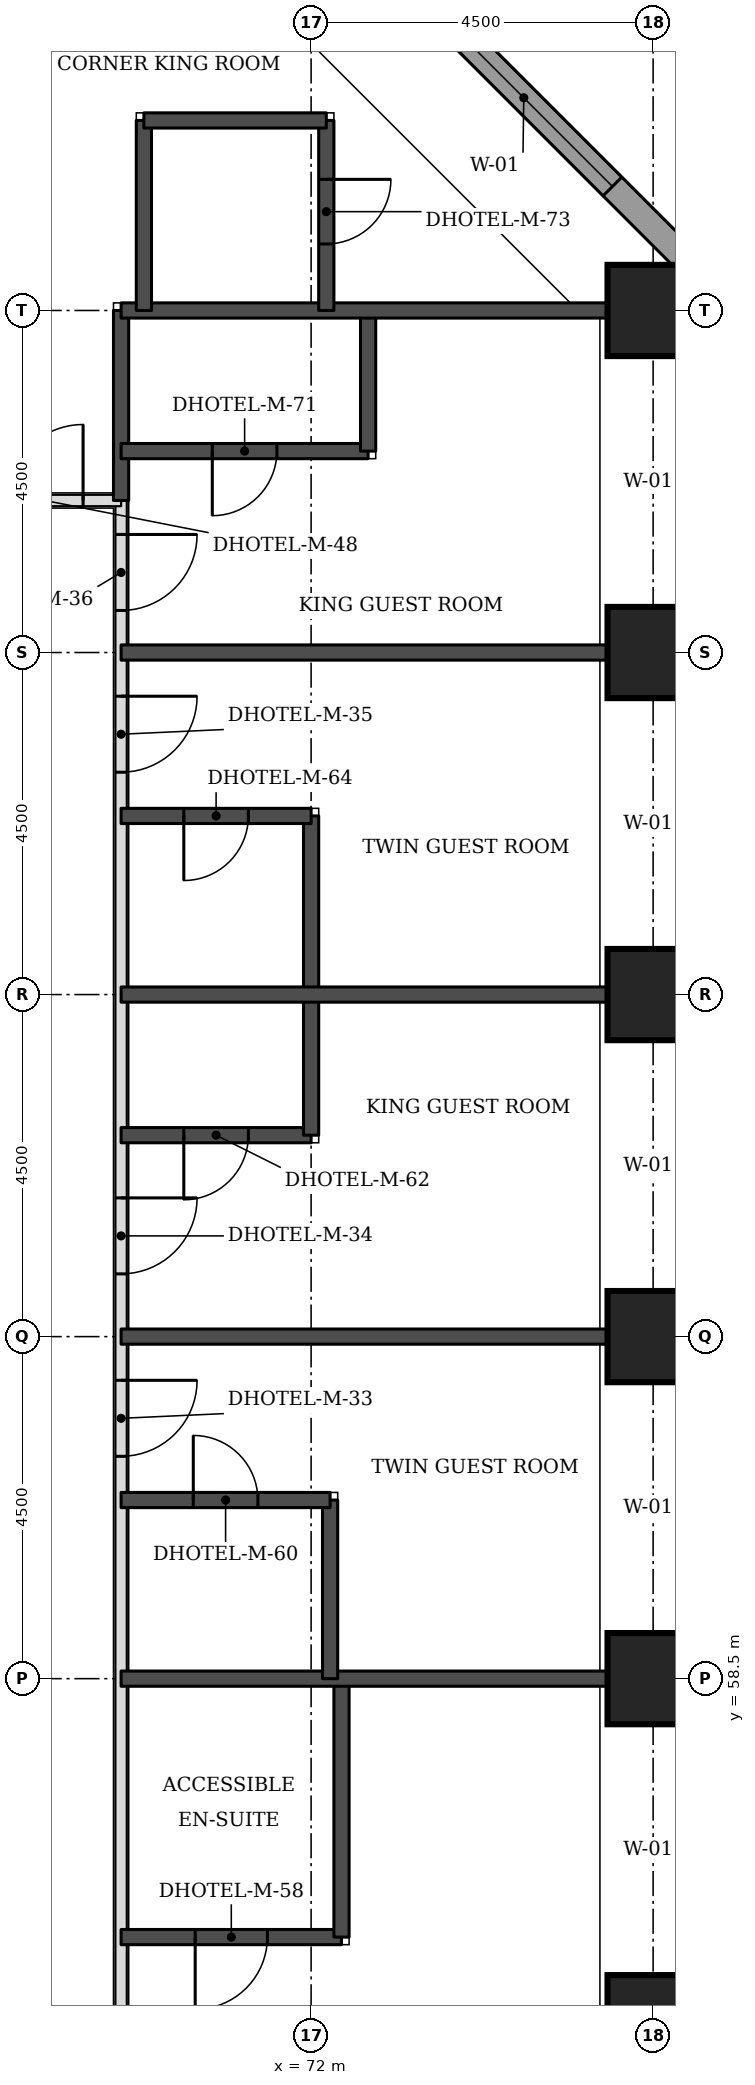
"""IFC4 building model, lengths in metres.
Left out: names, types, materials, properties, quantities, classifications, styles, units other than length and angle.
Written with IfcOpenShell. Run it as: python <this file> out.ifc"""

import sys

from ifc_helpers import new_model, si_unit, direction, frame, frame_2d, origin, origin_2d, place, context, subcontext, project, spatial, rectangle, extrude, element, fill, save


model = new_model("IFC4")
c1 = context("Model", 3, precision=1e-05, world=origin(), true_north=direction((0.0, 1.0)))
c2 = subcontext(c1, "Body", "Model", "MODEL_VIEW")
j1 = project(units=[si_unit("LENGTHUNIT", "METRE"), si_unit("PLANEANGLEUNIT", "RADIAN")], contexts=[c1])
p1 = place(None, origin())
s1 = spatial("IfcSite", under=j1, at=p1, CompositionType="ELEMENT")
p2 = place(p1, origin())
s2 = spatial("IfcBuilding", under=s1, at=p2, CompositionType="ELEMENT")
p3 = place(p2, frame((0.0, 0.0, 23.1)))
s3 = spatial("IfcBuildingStorey", under=s2, at=p3, CompositionType="ELEMENT", Elevation=23.1)
for number, where, z_axis, x_axis in (
    (1, (76.5, 54.0, 0.0), (0.0, 0.0, 1.0), (1.0, 0.0, 0.0)),
    (2, (76.5, 58.5, 0.0), (0.0, 0.0, 1.0), (1.0, 0.0, 0.0)),
    (3, (76.5, 63.0, 0.0), (0.0, 0.0, 1.0), (1.0, 0.0, 0.0)),
    (4, (76.5, 67.5, 0.0), (0.0, 0.0, 1.0), (1.0, 0.0, 0.0)),
    (5, (76.5, 72.0, 0.0), (0.0, 0.0, 1.0), (1.0, 0.0, 0.0)),
    (6, (76.5, 76.5, 0.0), (0.0, 0.0, 1.0), (1.0, 0.0, 0.0)),
):
    element("IfcColumn", number, at=place(p3, frame(where, z_axis=z_axis, x_axis=x_axis)), inside=s3, PredefinedType="COLUMN", context=c2, shape_type="SweptSolid", body=[
        extrude(rectangle(XDim=1.2, YDim=1.2, at=origin_2d()), origin(), (0.0, 0.0, 1.0), 3.3),
    ])
p4 = place(p3, frame((77.326, 76.77, 0.0), z_axis=(0.0, 0.0, 1.0), x_axis=(-0.707106781187, 0.707106781187, 0.0)))
e7 = element("IfcWall", 7, at=p4, inside=s3, PredefinedType="STANDARD", context=c2, shape_type="SweptSolid", body=[
    extrude(rectangle(XDim=7.151, YDim=0.35, at=frame_2d((3.576, 0.0))), origin(), (0.0, 0.0, 1.0), 3.055),
])
p5 = place(p4, frame((1.926, 0.0, 0.8)))
e8 = element("IfcOpeningElement", 8, at=p5, cuts=e7, PredefinedType="OPENING", context=c2, shape_type="SweptSolid", body=[
    extrude(rectangle(XDim=3.3, YDim=1.5, at=frame_2d((1.65, 0.75))), frame((0.0, 0.185, 0.0), z_axis=(0.0, -1.0, 0.0), x_axis=(1.0, 0.0, 0.0)), (0.0, 0.0, 1.0), 0.37),
])
p6 = place(p3, frame((69.5, 47.5, 0.0), z_axis=(0.0, 0.0, 1.0), x_axis=(0.0, 1.0, 0.0)))
e9 = element("IfcWall", 9, at=p6, inside=s3, PredefinedType="PARTITIONING", context=c2, shape_type="SweptSolid", body=[
    extrude(rectangle(XDim=26.5, YDim=0.15, at=frame_2d((13.25, 0.0))), origin(), (0.0, 0.0, 1.0), 3.08),
])
p7 = place(p6, frame((25.053, 0.0, 0.0)))
e10 = element("IfcOpeningElement", 10, at=p7, cuts=e9, PredefinedType="OPENING", context=c2, shape_type="SweptSolid", body=[
    extrude(rectangle(XDim=1.0, YDim=2.1, at=frame_2d((0.5, 1.05))), frame((0.0, 0.085, 0.0), z_axis=(0.0, -1.0, 0.0), x_axis=(1.0, 0.0, 0.0)), (0.0, 0.0, 1.0), 0.17),
])
p8 = place(p6, frame((22.925, 0.0, 0.0)))
e11 = element("IfcOpeningElement", 11, at=p8, cuts=e9, PredefinedType="OPENING", context=c2, shape_type="SweptSolid", body=[
    extrude(rectangle(XDim=1.0, YDim=2.1, at=frame_2d((0.5, 1.05))), frame((0.0, 0.085, 0.0), z_axis=(0.0, -1.0, 0.0), x_axis=(1.0, 0.0, 0.0)), (0.0, 0.0, 1.0), 0.17),
])
p9 = place(p6, frame((16.325, 0.0, 0.0)))
e12 = element("IfcOpeningElement", 12, at=p9, cuts=e9, PredefinedType="OPENING", context=c2, shape_type="SweptSolid", body=[
    extrude(rectangle(XDim=1.0, YDim=2.1, at=frame_2d((0.5, 1.05))), frame((0.0, 0.085, 0.0), z_axis=(0.0, -1.0, 0.0), x_axis=(1.0, 0.0, 0.0)), (0.0, 0.0, 1.0), 0.17),
])
p10 = place(p6, frame((13.925, 0.0, 0.0)))
e13 = element("IfcOpeningElement", 13, at=p10, cuts=e9, PredefinedType="OPENING", context=c2, shape_type="SweptSolid", body=[
    extrude(rectangle(XDim=1.0, YDim=2.1, at=frame_2d((0.5, 1.05))), frame((0.0, 0.085, 0.0), z_axis=(0.0, -1.0, 0.0), x_axis=(1.0, 0.0, 0.0)), (0.0, 0.0, 1.0), 0.17),
])
p11 = place(p6, frame((4.25, 0.0, 0.0)))
e14 = element("IfcOpeningElement", 14, at=p11, cuts=e9, PredefinedType="OPENING", context=c2, shape_type="SweptSolid", body=[
    extrude(rectangle(XDim=1.1, YDim=2.1, at=frame_2d((0.55, 1.05))), frame((0.0, 0.085, 0.0), z_axis=(0.0, -1.0, 0.0), x_axis=(1.0, 0.0, 0.0)), (0.0, 0.0, 1.0), 0.17),
])
p12 = place(p6, frame((0.447, 0.0, 0.0)))
e15 = element("IfcOpeningElement", 15, at=p12, cuts=e9, PredefinedType="OPENING", context=c2, shape_type="SweptSolid", body=[
    extrude(rectangle(XDim=1.0, YDim=2.1, at=frame_2d((0.5, 1.05))), frame((0.0, 0.085, 0.0), z_axis=(0.0, -1.0, 0.0), x_axis=(1.0, 0.0, 0.0)), (0.0, 0.0, 1.0), 0.17),
])
p13 = place(p3, frame((43.0, 74.0, 0.0), z_axis=(0.0, 0.0, 1.0), x_axis=(1.0, 0.0, 0.0)))
e16 = element("IfcWall", 16, at=p13, inside=s3, PredefinedType="PARTITIONING", context=c2, shape_type="SweptSolid", body=[
    extrude(rectangle(XDim=26.5, YDim=0.15, at=frame_2d((13.25, 0.0))), origin(), (0.0, 0.0, 1.0), 3.08),
])
p14 = place(p13, frame((4.925, 0.0, 0.0)))
e17 = element("IfcOpeningElement", 17, at=p14, cuts=e16, PredefinedType="OPENING", context=c2, shape_type="SweptSolid", body=[
    extrude(rectangle(XDim=1.0, YDim=2.1, at=frame_2d((0.5, 1.05))), frame((0.0, 0.085, 0.0), z_axis=(0.0, -1.0, 0.0), x_axis=(1.0, 0.0, 0.0)), (0.0, 0.0, 1.0), 0.17),
])
p15 = place(p13, frame((7.325, 0.0, 0.0)))
e18 = element("IfcOpeningElement", 18, at=p15, cuts=e16, PredefinedType="OPENING", context=c2, shape_type="SweptSolid", body=[
    extrude(rectangle(XDim=1.0, YDim=2.1, at=frame_2d((0.5, 1.05))), frame((0.0, 0.085, 0.0), z_axis=(0.0, -1.0, 0.0), x_axis=(1.0, 0.0, 0.0)), (0.0, 0.0, 1.0), 0.17),
])
p16 = place(p13, frame((13.925, 0.0, 0.0)))
e19 = element("IfcOpeningElement", 19, at=p16, cuts=e16, PredefinedType="OPENING", context=c2, shape_type="SweptSolid", body=[
    extrude(rectangle(XDim=1.0, YDim=2.1, at=frame_2d((0.5, 1.05))), frame((0.0, 0.085, 0.0), z_axis=(0.0, -1.0, 0.0), x_axis=(1.0, 0.0, 0.0)), (0.0, 0.0, 1.0), 0.17),
])
p17 = place(p13, frame((16.325, 0.0, 0.0)))
e20 = element("IfcOpeningElement", 20, at=p17, cuts=e16, PredefinedType="OPENING", context=c2, shape_type="SweptSolid", body=[
    extrude(rectangle(XDim=1.0, YDim=2.1, at=frame_2d((0.5, 1.05))), frame((0.0, 0.085, 0.0), z_axis=(0.0, -1.0, 0.0), x_axis=(1.0, 0.0, 0.0)), (0.0, 0.0, 1.0), 0.17),
])
p18 = place(p13, frame((22.925, 0.0, 0.0)))
e21 = element("IfcOpeningElement", 21, at=p18, cuts=e16, PredefinedType="OPENING", context=c2, shape_type="SweptSolid", body=[
    extrude(rectangle(XDim=1.0, YDim=2.1, at=frame_2d((0.5, 1.05))), frame((0.0, 0.085, 0.0), z_axis=(0.0, -1.0, 0.0), x_axis=(1.0, 0.0, 0.0)), (0.0, 0.0, 1.0), 0.17),
])
p19 = place(p13, frame((0.5, 0.0, 0.0)))
e22 = element("IfcOpeningElement", 22, at=p19, cuts=e16, PredefinedType="OPENING", context=c2, shape_type="SweptSolid", body=[
    extrude(rectangle(XDim=1.0, YDim=2.1, at=frame_2d((0.5, 1.05))), frame((0.0, 0.085, 0.0), z_axis=(0.0, -1.0, 0.0), x_axis=(1.0, 0.0, 0.0)), (0.0, 0.0, 1.0), 0.17),
])
p20 = place(p13, frame((25.0, 0.0, 0.0)))
e23 = element("IfcOpeningElement", 23, at=p20, cuts=e16, PredefinedType="OPENING", context=c2, shape_type="SweptSolid", body=[
    extrude(rectangle(XDim=1.0, YDim=2.1, at=frame_2d((0.5, 1.05))), frame((0.0, 0.085, 0.0), z_axis=(0.0, -1.0, 0.0), x_axis=(1.0, 0.0, 0.0)), (0.0, 0.0, 1.0), 0.17),
])
p21 = place(p3, frame((69.5, 55.1, 0.0), z_axis=(0.0, 0.0, 1.0), x_axis=(1.0, 0.0, 0.0)))
e24 = element("IfcWall", 24, at=p21, inside=s3, PredefinedType="SOLIDWALL", context=c2, shape_type="SweptSolid", body=[
    extrude(rectangle(XDim=2.9, YDim=0.2, at=frame_2d((1.45, 0.0))), origin(), (0.0, 0.0, 1.0), 3.08),
])
p22 = place(p21, frame((0.975, 0.0, 0.0)))
e25 = element("IfcOpeningElement", 25, at=p22, cuts=e24, PredefinedType="OPENING", context=c2, shape_type="SweptSolid", body=[
    extrude(rectangle(XDim=0.95, YDim=2.1, at=frame_2d((0.475, 1.05))), frame((0.0, 0.11, 0.0), z_axis=(0.0, -1.0, 0.0), x_axis=(1.0, 0.0, 0.0)), (0.0, 0.0, 1.0), 0.22),
])
p23 = place(p3, frame((72.4, 55.1, 0.0), z_axis=(0.0, 0.0, 1.0), x_axis=(0.0, 1.0, 0.0)))
e26 = element("IfcWall", 26, at=p23, inside=s3, PredefinedType="SOLIDWALL", context=c2, shape_type="SweptSolid", body=[
    extrude(rectangle(XDim=3.4, YDim=0.2, at=frame_2d((1.7, 0.0))), origin(), (0.0, 0.0, 1.0), 3.08),
])
p24 = place(p3, frame((69.5, 58.5, 0.0), z_axis=(0.0, 0.0, 1.0), x_axis=(1.0, 0.0, 0.0)))
e27 = element("IfcWall", 27, at=p24, inside=s3, PredefinedType="SOLIDWALL", context=c2, shape_type="SweptSolid", body=[
    extrude(rectangle(XDim=6.4, YDim=0.2, at=frame_2d((3.2, 0.0))), origin(), (0.0, 0.0, 1.0), 3.08),
])
p25 = place(p3, frame((72.25, 58.5, 0.0), z_axis=(0.0, 0.0, 1.0), x_axis=(0.0, 1.0, 0.0)))
e28 = element("IfcWall", 28, at=p25, inside=s3, PredefinedType="SOLIDWALL", context=c2, shape_type="SweptSolid", body=[
    extrude(rectangle(XDim=2.35, YDim=0.2, at=frame_2d((1.175, 0.0))), origin(), (0.0, 0.0, 1.0), 3.08),
])
p26 = place(p3, frame((69.5, 60.85, 0.0), z_axis=(0.0, 0.0, 1.0), x_axis=(1.0, 0.0, 0.0)))
e29 = element("IfcWall", 29, at=p26, inside=s3, PredefinedType="SOLIDWALL", context=c2, shape_type="SweptSolid", body=[
    extrude(rectangle(XDim=2.75, YDim=0.2, at=frame_2d((1.375, 0.0))), origin(), (0.0, 0.0, 1.0), 3.08),
])
p27 = place(p26, frame((0.95, 0.0, 0.0)))
e30 = element("IfcOpeningElement", 30, at=p27, cuts=e29, PredefinedType="OPENING", context=c2, shape_type="SweptSolid", body=[
    extrude(rectangle(XDim=0.85, YDim=2.1, at=frame_2d((0.425, 1.05))), frame((0.0, 0.11, 0.0), z_axis=(0.0, -1.0, 0.0), x_axis=(1.0, 0.0, 0.0)), (0.0, 0.0, 1.0), 0.22),
])
p28 = place(p3, frame((69.5, 63.0, 0.0), z_axis=(0.0, 0.0, 1.0), x_axis=(1.0, 0.0, 0.0)))
e31 = element("IfcWall", 31, at=p28, inside=s3, PredefinedType="SOLIDWALL", context=c2, shape_type="SweptSolid", body=[
    extrude(rectangle(XDim=6.4, YDim=0.2, at=frame_2d((3.2, 0.0))), origin(), (0.0, 0.0, 1.0), 3.08),
])
p29 = place(p3, frame((69.5, 65.65, 0.0), z_axis=(0.0, 0.0, 1.0), x_axis=(1.0, 0.0, 0.0)))
e32 = element("IfcWall", 32, at=p29, inside=s3, PredefinedType="SOLIDWALL", context=c2, shape_type="SweptSolid", body=[
    extrude(rectangle(XDim=2.5, YDim=0.2, at=frame_2d((1.25, 0.0))), origin(), (0.0, 0.0, 1.0), 3.08),
])
p30 = place(p29, frame((0.825, 0.0, 0.0)))
e33 = element("IfcOpeningElement", 33, at=p30, cuts=e32, PredefinedType="OPENING", context=c2, shape_type="SweptSolid", body=[
    extrude(rectangle(XDim=0.85, YDim=2.1, at=frame_2d((0.425, 1.05))), frame((0.0, 0.11, 0.0), z_axis=(0.0, -1.0, 0.0), x_axis=(1.0, 0.0, 0.0)), (0.0, 0.0, 1.0), 0.22),
])
p31 = place(p3, frame((72.0, 65.65, 0.0), z_axis=(0.0, 0.0, 1.0), x_axis=(0.0, 1.0, 0.0)))
e34 = element("IfcWall", 34, at=p31, inside=s3, PredefinedType="SOLIDWALL", context=c2, shape_type="SweptSolid", body=[
    extrude(rectangle(XDim=4.2, YDim=0.2, at=frame_2d((2.1, 0.0))), origin(), (0.0, 0.0, 1.0), 3.08),
])
p32 = place(p3, frame((69.5, 67.5, 0.0), z_axis=(0.0, 0.0, 1.0), x_axis=(1.0, 0.0, 0.0)))
e35 = element("IfcWall", 35, at=p32, inside=s3, PredefinedType="SOLIDWALL", context=c2, shape_type="SweptSolid", body=[
    extrude(rectangle(XDim=6.4, YDim=0.2, at=frame_2d((3.2, 0.0))), origin(), (0.0, 0.0, 1.0), 3.08),
])
p33 = place(p3, frame((69.5, 69.85, 0.0), z_axis=(0.0, 0.0, 1.0), x_axis=(1.0, 0.0, 0.0)))
e36 = element("IfcWall", 36, at=p33, inside=s3, PredefinedType="SOLIDWALL", context=c2, shape_type="SweptSolid", body=[
    extrude(rectangle(XDim=2.5, YDim=0.2, at=frame_2d((1.25, 0.0))), origin(), (0.0, 0.0, 1.0), 3.08),
])
p34 = place(p33, frame((0.825, 0.0, 0.0)))
e37 = element("IfcOpeningElement", 37, at=p34, cuts=e36, PredefinedType="OPENING", context=c2, shape_type="SweptSolid", body=[
    extrude(rectangle(XDim=0.85, YDim=2.1, at=frame_2d((0.425, 1.05))), frame((0.0, 0.11, 0.0), z_axis=(0.0, -1.0, 0.0), x_axis=(1.0, 0.0, 0.0)), (0.0, 0.0, 1.0), 0.22),
])
p35 = place(p3, frame((69.5, 72.0, 0.0), z_axis=(0.0, 0.0, 1.0), x_axis=(1.0, 0.0, 0.0)))
e38 = element("IfcWall", 38, at=p35, inside=s3, PredefinedType="SOLIDWALL", context=c2, shape_type="SweptSolid", body=[
    extrude(rectangle(XDim=6.4, YDim=0.2, at=frame_2d((3.2, 0.0))), origin(), (0.0, 0.0, 1.0), 3.08),
])
p36 = place(p3, frame((69.5, 74.0, 0.0), z_axis=(0.0, 0.0, 1.0), x_axis=(0.0, 1.0, 0.0)))
e39 = element("IfcWall", 39, at=p36, inside=s3, PredefinedType="SOLIDWALL", context=c2, shape_type="SweptSolid", body=[
    extrude(rectangle(XDim=2.5, YDim=0.2, at=frame_2d((1.25, 0.0))), origin(), (0.0, 0.0, 1.0), 3.08),
])
p37 = place(p3, frame((69.5, 74.65, 0.0), z_axis=(0.0, 0.0, 1.0), x_axis=(1.0, 0.0, 0.0)))
e40 = element("IfcWall", 40, at=p37, inside=s3, PredefinedType="SOLIDWALL", context=c2, shape_type="SweptSolid", body=[
    extrude(rectangle(XDim=3.25, YDim=0.2, at=frame_2d((1.625, 0.0))), origin(), (0.0, 0.0, 1.0), 3.08),
])
p38 = place(p37, frame((1.2, 0.0, 0.0)))
e41 = element("IfcOpeningElement", 41, at=p38, cuts=e40, PredefinedType="OPENING", context=c2, shape_type="SweptSolid", body=[
    extrude(rectangle(XDim=0.85, YDim=2.1, at=frame_2d((0.425, 1.05))), frame((0.0, 0.11, 0.0), z_axis=(0.0, -1.0, 0.0), x_axis=(1.0, 0.0, 0.0)), (0.0, 0.0, 1.0), 0.22),
])
p39 = place(p3, frame((72.75, 74.65, 0.0), z_axis=(0.0, 0.0, 1.0), x_axis=(0.0, 1.0, 0.0)))
e42 = element("IfcWall", 42, at=p39, inside=s3, PredefinedType="SOLIDWALL", context=c2, shape_type="SweptSolid", body=[
    extrude(rectangle(XDim=1.85, YDim=0.2, at=frame_2d((0.925, 0.0))), origin(), (0.0, 0.0, 1.0), 3.08),
])
p40 = place(p3, frame((69.5, 76.5, 0.0), z_axis=(0.0, 0.0, 1.0), x_axis=(1.0, 0.0, 0.0)))
e43 = element("IfcWall", 43, at=p40, inside=s3, PredefinedType="SOLIDWALL", context=c2, shape_type="SweptSolid", body=[
    extrude(rectangle(XDim=6.4, YDim=0.2, at=frame_2d((3.2, 0.0))), origin(), (0.0, 0.0, 1.0), 3.08),
])
p41 = place(p3, frame((69.8, 76.5, 0.0), z_axis=(0.0, 0.0, 1.0), x_axis=(0.0, 1.0, 0.0)))
e44 = element("IfcWall", 44, at=p41, inside=s3, PredefinedType="SOLIDWALL", context=c2, shape_type="SweptSolid", body=[
    extrude(rectangle(XDim=2.5, YDim=0.2, at=frame_2d((1.25, 0.0))), origin(), (0.0, 0.0, 1.0), 3.08),
])
p42 = place(p3, frame((72.2, 76.5, 0.0), z_axis=(0.0, 0.0, 1.0), x_axis=(0.0, 1.0, 0.0)))
e45 = element("IfcWall", 45, at=p42, inside=s3, PredefinedType="SOLIDWALL", context=c2, shape_type="SweptSolid", body=[
    extrude(rectangle(XDim=2.5, YDim=0.2, at=frame_2d((1.25, 0.0))), origin(), (0.0, 0.0, 1.0), 3.08),
])
p43 = place(p42, frame((0.875, 0.0, 0.0)))
e46 = element("IfcOpeningElement", 46, at=p43, cuts=e45, PredefinedType="OPENING", context=c2, shape_type="SweptSolid", body=[
    extrude(rectangle(XDim=0.85, YDim=2.1, at=frame_2d((0.425, 1.05))), frame((0.0, 0.11, 0.0), z_axis=(0.0, -1.0, 0.0), x_axis=(1.0, 0.0, 0.0)), (0.0, 0.0, 1.0), 0.22),
])
p44 = place(p3, frame((69.8, 79.0, 0.0), z_axis=(0.0, 0.0, 1.0), x_axis=(1.0, 0.0, 0.0)))
e47 = element("IfcWall", 47, at=p44, inside=s3, PredefinedType="SOLIDWALL", context=c2, shape_type="SweptSolid", body=[
    extrude(rectangle(XDim=2.4, YDim=0.2, at=frame_2d((1.2, 0.0))), origin(), (0.0, 0.0, 1.0), 3.08),
])
p45 = place(p5, origin())
e48 = element("IfcWindow", 48, at=p45, inside=s3, PartitioningType="SINGLE_PANEL", PredefinedType="WINDOW", context=c2, shape_type="SweptSolid", body=[
    extrude(rectangle(XDim=3.3, YDim=1.5, at=frame_2d((1.65, 0.75))), frame((0.0, 0.085, 0.0), z_axis=(0.0, -1.0, 0.0), x_axis=(1.0, 0.0, 0.0)), (0.0, 0.0, 1.0), 0.06),
])
fill(e8, e48)
p46 = place(p7, frame((1.0, 0.0, 0.0), z_axis=(0.0, 0.0, 1.0), x_axis=(-1.0, 0.0, 0.0)))
e49 = element("IfcDoor", 49, at=p46, inside=s3, OperationType="SINGLE_SWING_LEFT", PredefinedType="DOOR", context=c2, shape_type="SweptSolid", body=[
    extrude(rectangle(XDim=1.0, YDim=2.1, at=frame_2d((0.5, 1.05))), frame((0.0, 0.025, 0.0), z_axis=(0.0, -1.0, 0.0), x_axis=(1.0, 0.0, 0.0)), (0.0, 0.0, 1.0), 0.05),
])
fill(e10, e49)
p47 = place(p38, frame((0.85, 0.0, 0.0), z_axis=(0.0, 0.0, 1.0), x_axis=(-1.0, 0.0, 0.0)))
e50 = element("IfcDoor", 50, at=p47, inside=s3, OperationType="SINGLE_SWING_RIGHT", PredefinedType="DOOR", context=c2, shape_type="SweptSolid", body=[
    extrude(rectangle(XDim=0.85, YDim=2.1, at=frame_2d((0.425, 1.05))), frame((0.0, 0.025, 0.0), z_axis=(0.0, -1.0, 0.0), x_axis=(1.0, 0.0, 0.0)), (0.0, 0.0, 1.0), 0.05),
])
fill(e41, e50)
p48 = place(p8, frame((1.0, 0.0, 0.0), z_axis=(0.0, 0.0, 1.0), x_axis=(-1.0, 0.0, 0.0)))
e51 = element("IfcDoor", 51, at=p48, inside=s3, OperationType="SINGLE_SWING_LEFT", PredefinedType="DOOR", context=c2, shape_type="SweptSolid", body=[
    extrude(rectangle(XDim=1.0, YDim=2.1, at=frame_2d((0.5, 1.05))), frame((0.0, 0.025, 0.0), z_axis=(0.0, -1.0, 0.0), x_axis=(1.0, 0.0, 0.0)), (0.0, 0.0, 1.0), 0.05),
])
fill(e11, e51)
p49 = place(p34, frame((0.85, 0.0, 0.0), z_axis=(0.0, 0.0, 1.0), x_axis=(-1.0, 0.0, 0.0)))
e52 = element("IfcDoor", 52, at=p49, inside=s3, OperationType="SINGLE_SWING_RIGHT", PredefinedType="DOOR", context=c2, shape_type="SweptSolid", body=[
    extrude(rectangle(XDim=0.85, YDim=2.1, at=frame_2d((0.425, 1.05))), frame((0.0, 0.025, 0.0), z_axis=(0.0, -1.0, 0.0), x_axis=(1.0, 0.0, 0.0)), (0.0, 0.0, 1.0), 0.05),
])
fill(e37, e52)
p50 = place(p9, frame((1.0, 0.0, 0.0), z_axis=(0.0, 0.0, 1.0), x_axis=(-1.0, 0.0, 0.0)))
e53 = element("IfcDoor", 53, at=p50, inside=s3, OperationType="SINGLE_SWING_LEFT", PredefinedType="DOOR", context=c2, shape_type="SweptSolid", body=[
    extrude(rectangle(XDim=1.0, YDim=2.1, at=frame_2d((0.5, 1.05))), frame((0.0, 0.025, 0.0), z_axis=(0.0, -1.0, 0.0), x_axis=(1.0, 0.0, 0.0)), (0.0, 0.0, 1.0), 0.05),
])
fill(e12, e53)
p51 = place(p30, frame((0.85, 0.0, 0.0), z_axis=(0.0, 0.0, 1.0), x_axis=(-1.0, 0.0, 0.0)))
e54 = element("IfcDoor", 54, at=p51, inside=s3, OperationType="SINGLE_SWING_RIGHT", PredefinedType="DOOR", context=c2, shape_type="SweptSolid", body=[
    extrude(rectangle(XDim=0.85, YDim=2.1, at=frame_2d((0.425, 1.05))), frame((0.0, 0.025, 0.0), z_axis=(0.0, -1.0, 0.0), x_axis=(1.0, 0.0, 0.0)), (0.0, 0.0, 1.0), 0.05),
])
fill(e33, e54)
p52 = place(p10, frame((1.0, 0.0, 0.0), z_axis=(0.0, 0.0, 1.0), x_axis=(-1.0, 0.0, 0.0)))
e55 = element("IfcDoor", 55, at=p52, inside=s3, OperationType="SINGLE_SWING_LEFT", PredefinedType="DOOR", context=c2, shape_type="SweptSolid", body=[
    extrude(rectangle(XDim=1.0, YDim=2.1, at=frame_2d((0.5, 1.05))), frame((0.0, 0.025, 0.0), z_axis=(0.0, -1.0, 0.0), x_axis=(1.0, 0.0, 0.0)), (0.0, 0.0, 1.0), 0.05),
])
fill(e13, e55)
p53 = place(p27, origin())
e56 = element("IfcDoor", 56, at=p53, inside=s3, OperationType="SINGLE_SWING_LEFT", PredefinedType="DOOR", context=c2, shape_type="SweptSolid", body=[
    extrude(rectangle(XDim=0.85, YDim=2.1, at=frame_2d((0.425, 1.05))), frame((0.0, 0.025, 0.0), z_axis=(0.0, -1.0, 0.0), x_axis=(1.0, 0.0, 0.0)), (0.0, 0.0, 1.0), 0.05),
])
fill(e30, e56)
p54 = place(p22, frame((0.95, 0.0, 0.0), z_axis=(0.0, 0.0, 1.0), x_axis=(-1.0, 0.0, 0.0)))
e57 = element("IfcDoor", 57, at=p54, inside=s3, OperationType="SINGLE_SWING_RIGHT", PredefinedType="DOOR", context=c2, shape_type="SweptSolid", body=[
    extrude(rectangle(XDim=0.95, YDim=2.1, at=frame_2d((0.475, 1.05))), frame((0.0, 0.025, 0.0), z_axis=(0.0, -1.0, 0.0), x_axis=(1.0, 0.0, 0.0)), (0.0, 0.0, 1.0), 0.05),
])
fill(e25, e57)
p55 = place(p20, origin())
e58 = element("IfcDoor", 58, at=p55, inside=s3, OperationType="SINGLE_SWING_RIGHT", PredefinedType="DOOR", context=c2, shape_type="SweptSolid", body=[
    extrude(rectangle(XDim=1.0, YDim=2.1, at=frame_2d((0.5, 1.05))), frame((0.0, 0.025, 0.0), z_axis=(0.0, -1.0, 0.0), x_axis=(1.0, 0.0, 0.0)), (0.0, 0.0, 1.0), 0.05),
])
fill(e23, e58)
p56 = place(p43, frame((0.85, 0.0, 0.0), z_axis=(0.0, 0.0, 1.0), x_axis=(-1.0, 0.0, 0.0)))
e59 = element("IfcDoor", 59, at=p56, inside=s3, OperationType="SINGLE_SWING_LEFT", PredefinedType="DOOR", context=c2, shape_type="SweptSolid", body=[
    extrude(rectangle(XDim=0.85, YDim=2.1, at=frame_2d((0.425, 1.05))), frame((0.0, 0.025, 0.0), z_axis=(0.0, -1.0, 0.0), x_axis=(1.0, 0.0, 0.0)), (0.0, 0.0, 1.0), 0.05),
])
fill(e46, e59)
save(model, sys.argv[1])
